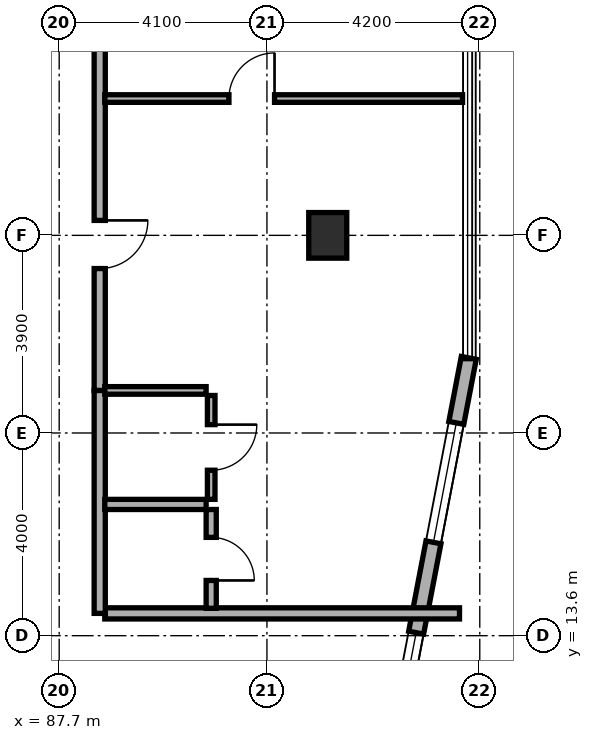
"""IFC4 building model, lengths in metres.
Left out: names, types, materials, properties, quantities, classifications, styles, units other than length and angle.
Written with IfcOpenShell. Run it as: python <this file> out.ifc"""

import sys

from ifc_helpers import new_model, si_unit, direction, frame, frame_2d, origin, origin_2d, place, context, subcontext, project, spatial, rectangle, extrude, element, fill, save


model = new_model("IFC4")
c1 = context("Model", 3, precision=1e-05, world=origin(), true_north=direction((0.0, 1.0)))
c2 = subcontext(c1, "Body", "Model", "MODEL_VIEW")
j1 = project(units=[si_unit("LENGTHUNIT", "METRE"), si_unit("PLANEANGLEUNIT", "RADIAN")], contexts=[c1])
p1 = place(None, origin())
s1 = spatial("IfcSite", under=j1, at=p1, CompositionType="ELEMENT")
p2 = place(p1, origin())
s2 = spatial("IfcBuilding", under=s1, at=p2, CompositionType="ELEMENT")
p3 = place(p2, frame((0.0, 0.0, 45.0)))
s3 = spatial("IfcBuildingStorey", under=s2, at=p3, CompositionType="ELEMENT", Elevation=45.0)
p4 = place(p3, frame((93.0, 21.5, 0.0), z_axis=(0.0, 0.0, 1.0), x_axis=(1.0, 0.0, 0.0)))
e1 = element("IfcColumn", 1, at=p4, inside=s3, PredefinedType="COLUMN", context=c2, shape_type="SweptSolid", body=[
    extrude(rectangle(XDim=0.75, YDim=0.9, at=origin_2d()), origin(), (0.0, 0.0, 1.0), 3.5),
])
p5 = place(p3, frame((93.971, 9.62, 0.0), z_axis=(0.0, 0.0, 1.0), x_axis=(0.188087874316, 0.982152203854, 0.0)))
e2 = element("IfcWall", 2, at=p5, inside=s3, PredefinedType="STANDARD", context=c2, shape_type="SweptSolid", body=[
    extrude(rectangle(XDim=9.634, YDim=0.3, at=frame_2d((4.817, 0.0))), origin(), (0.0, 0.0, 1.0), 3.25),
])
p6 = place(p5, frame((0.452, 0.0, 0.85)))
e3 = element("IfcOpeningElement", 3, at=p6, cuts=e2, PredefinedType="OPENING", context=c2, shape_type="SweptSolid", body=[
    extrude(rectangle(XDim=1.5, YDim=1.5, at=frame_2d((0.75, 0.75))), frame((0.0, 0.16, 0.0), z_axis=(0.0, -1.0, 0.0), x_axis=(1.0, 0.0, 0.0)), (0.0, 0.0, 1.0), 0.32),
])
p7 = place(p5, frame((2.913, 0.0, 0.85)))
e4 = element("IfcOpeningElement", 4, at=p7, cuts=e2, PredefinedType="OPENING", context=c2, shape_type="SweptSolid", body=[
    extrude(rectangle(XDim=1.2, YDim=1.5, at=frame_2d((0.6, 0.75))), frame((0.0, 0.16, 0.0), z_axis=(0.0, -1.0, 0.0), x_axis=(1.0, 0.0, 0.0)), (0.0, 0.0, 1.0), 0.32),
])
p8 = place(p5, frame((5.928, 0.0, 0.8)))
e5 = element("IfcOpeningElement", 5, at=p8, cuts=e2, PredefinedType="OPENING", context=c2, shape_type="SweptSolid", body=[
    extrude(rectangle(XDim=2.4, YDim=1.6, at=frame_2d((1.2, 0.8))), frame((0.0, 0.16, 0.0), z_axis=(0.0, -1.0, 0.0), x_axis=(1.0, 0.0, 0.0)), (0.0, 0.0, 1.0), 0.32),
])
p9 = place(p3, frame((88.6, 14.04, 0.0), z_axis=(0.0, 0.0, 1.0), x_axis=(1.0, 0.0, 0.0)))
e6 = element("IfcWall", 6, at=p9, inside=s3, PredefinedType="SOLIDWALL", context=c2, shape_type="SweptSolid", body=[
    extrude(rectangle(XDim=7.0, YDim=0.22, at=frame_2d((3.5, 0.0))), origin(), (0.0, 0.0, 1.0), 2.865),
])
p10 = place(p3, frame((88.5, 14.04, 0.0), z_axis=(0.0, 0.0, 1.0), x_axis=(0.0, 1.0, 0.0)))
e7 = element("IfcWall", 7, at=p10, inside=s3, PredefinedType="SOLIDWALL", context=c2, shape_type="SweptSolid", body=[
    extrude(rectangle(XDim=4.4, YDim=0.22, at=frame_2d((2.2, 0.0))), origin(), (0.0, 0.0, 1.0), 3.22),
])
p11 = place(p3, frame((88.5, 18.44, 0.0), z_axis=(0.0, 0.0, 1.0), x_axis=(0.0, 1.0, 0.0)))
e8 = element("IfcWall", 8, at=p11, inside=s3, PredefinedType="SOLIDWALL", context=c2, shape_type="SweptSolid", body=[
    extrude(rectangle(XDim=9.56, YDim=0.22, at=frame_2d((4.78, 0.0))), origin(), (0.0, 0.0, 1.0), 2.725),
])
p12 = place(p11, frame((2.405, 0.0, 0.0)))
e9 = element("IfcOpeningElement", 9, at=p12, cuts=e8, PredefinedType="OPENING", context=c2, shape_type="SweptSolid", body=[
    extrude(rectangle(XDim=0.95, YDim=2.1, at=frame_2d((0.475, 1.05))), frame((0.0, 0.12, 0.0), z_axis=(0.0, -1.0, 0.0), x_axis=(1.0, 0.0, 0.0)), (0.0, 0.0, 1.0), 0.24),
])
p13 = place(p3, frame((88.6, 24.2, 0.0), z_axis=(0.0, 0.0, 1.0), x_axis=(1.0, 0.0, 0.0)))
e10 = element("IfcWall", 10, at=p13, inside=s3, PredefinedType="PARTITIONING", context=c2, shape_type="SweptSolid", body=[
    extrude(rectangle(XDim=7.06, YDim=0.15, at=frame_2d((3.53, 0.0))), origin(), (0.0, 0.0, 1.0), 2.865),
])
p14 = place(p13, frame((2.45, 0.0, 0.0)))
e11 = element("IfcOpeningElement", 11, at=p14, cuts=e10, PredefinedType="OPENING", context=c2, shape_type="SweptSolid", body=[
    extrude(rectangle(XDim=0.9, YDim=2.1, at=frame_2d((0.45, 1.05))), frame((0.0, 0.085, 0.0), z_axis=(0.0, -1.0, 0.0), x_axis=(1.0, 0.0, 0.0)), (0.0, 0.0, 1.0), 0.17),
])
p15 = place(p3, frame((88.6, 16.19, 0.0), z_axis=(0.0, 0.0, 1.0), x_axis=(1.0, 0.0, 0.0)))
e12 = element("IfcWall", 12, at=p15, inside=s3, PredefinedType="PLUMBINGWALL", context=c2, shape_type="SweptSolid", body=[
    extrude(rectangle(XDim=2.0, YDim=0.2, at=frame_2d((1.0, 0.0))), origin(), (0.0, 0.0, 1.0), 3.22),
])
p16 = place(p3, frame((88.6, 18.44, 0.0), z_axis=(0.0, 0.0, 1.0), x_axis=(1.0, 0.0, 0.0)))
e13 = element("IfcWall", 13, at=p16, inside=s3, PredefinedType="PARTITIONING", context=c2, shape_type="SweptSolid", body=[
    extrude(rectangle(XDim=2.0, YDim=0.15, at=frame_2d((1.0, 0.0))), origin(), (0.0, 0.0, 1.0), 3.22),
])
p17 = place(p3, frame((90.7, 14.14, 0.0), z_axis=(0.0, 0.0, 1.0), x_axis=(0.0, 1.0, 0.0)))
e14 = element("IfcWall", 14, at=p17, inside=s3, PredefinedType="PLUMBINGWALL", context=c2, shape_type="SweptSolid", body=[
    extrude(rectangle(XDim=1.95, YDim=0.2, at=frame_2d((0.975, 0.0))), origin(), (0.0, 0.0, 1.0), 3.22),
])
p18 = place(p17, frame((0.55, 0.0, 0.0)))
e15 = element("IfcOpeningElement", 15, at=p18, cuts=e14, PredefinedType="OPENING", context=c2, shape_type="SweptSolid", body=[
    extrude(rectangle(XDim=0.85, YDim=2.1, at=frame_2d((0.425, 1.05))), frame((0.0, 0.11, 0.0), z_axis=(0.0, -1.0, 0.0), x_axis=(1.0, 0.0, 0.0)), (0.0, 0.0, 1.0), 0.22),
])
p19 = place(p3, frame((90.7, 16.29, 0.0), z_axis=(0.0, 0.0, 1.0), x_axis=(0.0, 1.0, 0.0)))
e16 = element("IfcWall", 16, at=p19, inside=s3, PredefinedType="PARTITIONING", context=c2, shape_type="SweptSolid", body=[
    extrude(rectangle(XDim=2.05, YDim=0.15, at=frame_2d((1.025, 0.0))), origin(), (0.0, 0.0, 1.0), 3.22),
])
p20 = place(p19, frame((0.575, 0.0, 0.0)))
e17 = element("IfcOpeningElement", 17, at=p20, cuts=e16, PredefinedType="OPENING", context=c2, shape_type="SweptSolid", body=[
    extrude(rectangle(XDim=0.9, YDim=2.1, at=frame_2d((0.45, 1.05))), frame((0.0, 0.085, 0.0), z_axis=(0.0, -1.0, 0.0), x_axis=(1.0, 0.0, 0.0)), (0.0, 0.0, 1.0), 0.17),
])
p21 = place(p7, origin())
e18 = element("IfcWindow", 18, at=p21, inside=s3, PartitioningType="SINGLE_PANEL", PredefinedType="WINDOW", context=c2, shape_type="SweptSolid", body=[
    extrude(rectangle(XDim=1.2, YDim=1.5, at=frame_2d((0.6, 0.75))), frame((0.0, 0.03, 0.0), z_axis=(0.0, -1.0, 0.0), x_axis=(1.0, 0.0, 0.0)), (0.0, 0.0, 1.0), 0.06),
])
fill(e4, e18)
p22 = place(p8, origin())
e19 = element("IfcWindow", 19, at=p22, inside=s3, PartitioningType="SINGLE_PANEL", PredefinedType="WINDOW", context=c2, shape_type="SweptSolid", body=[
    extrude(rectangle(XDim=2.4, YDim=1.6, at=frame_2d((1.2, 0.8))), frame((0.0, 0.03, 0.0), z_axis=(0.0, -1.0, 0.0), x_axis=(1.0, 0.0, 0.0)), (0.0, 0.0, 1.0), 0.06),
])
fill(e5, e19)
p23 = place(p12, frame((0.95, 0.0, 0.0), z_axis=(0.0, 0.0, 1.0), x_axis=(-1.0, 0.0, 0.0)))
e20 = element("IfcDoor", 20, at=p23, inside=s3, OperationType="SINGLE_SWING_LEFT", PredefinedType="DOOR", context=c2, shape_type="SweptSolid", body=[
    extrude(rectangle(XDim=0.95, YDim=2.1, at=frame_2d((0.475, 1.05))), frame((0.0, 0.025, 0.0), z_axis=(0.0, -1.0, 0.0), x_axis=(1.0, 0.0, 0.0)), (0.0, 0.0, 1.0), 0.05),
])
fill(e9, e20)
p24 = place(p14, origin())
e21 = element("IfcDoor", 21, at=p24, inside=s3, OperationType="SINGLE_SWING_RIGHT", PredefinedType="DOOR", context=c2, shape_type="SweptSolid", body=[
    extrude(rectangle(XDim=0.9, YDim=2.1, at=frame_2d((0.45, 1.05))), frame((0.0, 0.025, 0.0), z_axis=(0.0, -1.0, 0.0), x_axis=(1.0, 0.0, 0.0)), (0.0, 0.0, 1.0), 0.05),
])
fill(e11, e21)
p25 = place(p18, frame((0.85, 0.0, 0.0), z_axis=(0.0, 0.0, 1.0), x_axis=(-1.0, 0.0, 0.0)))
e22 = element("IfcDoor", 22, at=p25, inside=s3, OperationType="SINGLE_SWING_RIGHT", PredefinedType="DOOR", context=c2, shape_type="SweptSolid", body=[
    extrude(rectangle(XDim=0.85, YDim=2.1, at=frame_2d((0.425, 1.05))), frame((0.0, 0.025, 0.0), z_axis=(0.0, -1.0, 0.0), x_axis=(1.0, 0.0, 0.0)), (0.0, 0.0, 1.0), 0.05),
])
fill(e15, e22)
p26 = place(p20, frame((0.9, 0.0, 0.0), z_axis=(0.0, 0.0, 1.0), x_axis=(-1.0, 0.0, 0.0)))
e23 = element("IfcDoor", 23, at=p26, inside=s3, OperationType="SINGLE_SWING_LEFT", PredefinedType="DOOR", context=c2, shape_type="SweptSolid", body=[
    extrude(rectangle(XDim=0.9, YDim=2.1, at=frame_2d((0.45, 1.05))), frame((0.0, 0.025, 0.0), z_axis=(0.0, -1.0, 0.0), x_axis=(1.0, 0.0, 0.0)), (0.0, 0.0, 1.0), 0.05),
])
fill(e17, e23)
save(model, sys.argv[1])
